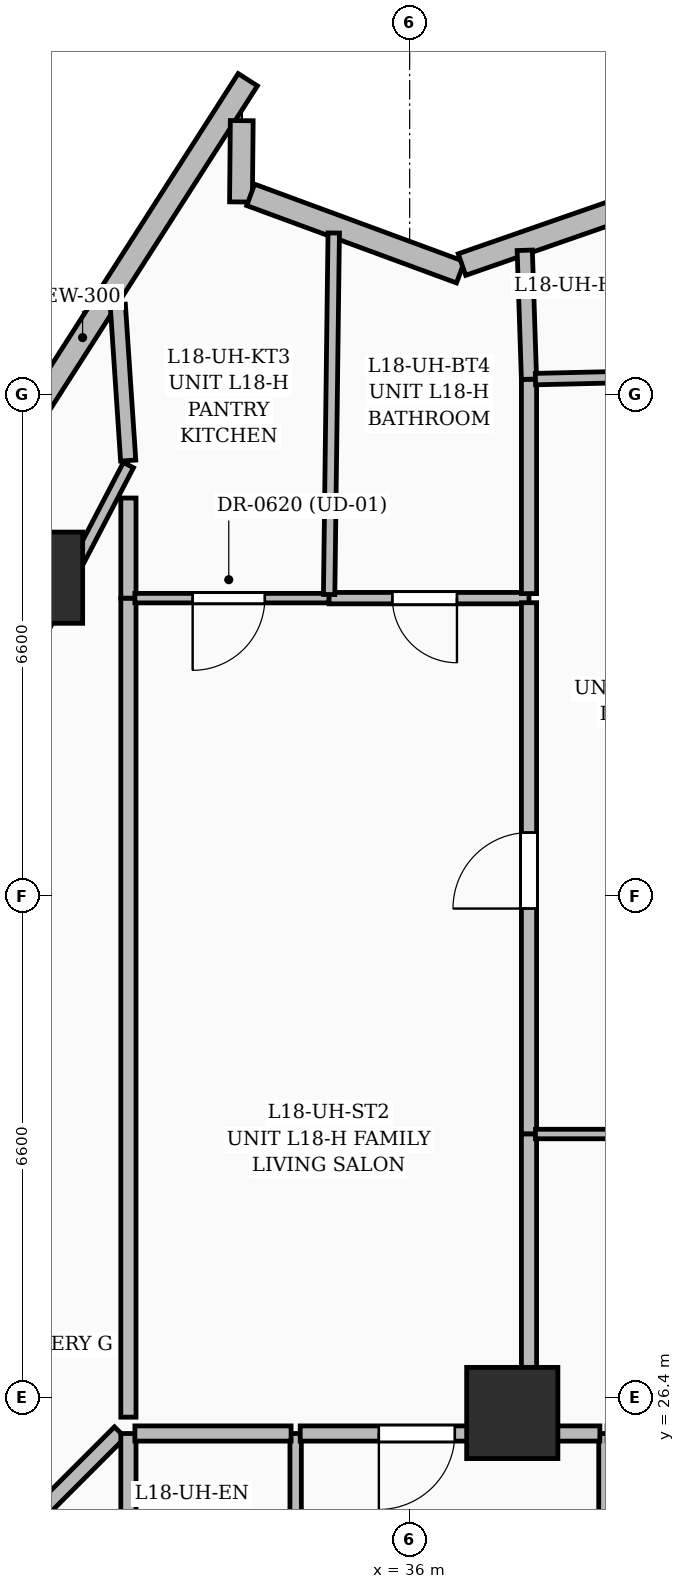
"""IFC4 building model, lengths in metres.
Left out: names, types, materials, properties, quantities, classifications, styles, units other than length and angle.
Written with IfcOpenShell. Run it as: python <this file> out.ifc"""

import sys

from ifc_helpers import new_model, si_unit, direction, frame, frame_2d, origin, origin_2d, place, context, subcontext, project, spatial, rectangle, extrude, element, fill, save


model = new_model("IFC4")
c1 = context("Model", 3, precision=1e-05, world=origin(), true_north=direction((0.0, 1.0)))
c2 = subcontext(c1, "Body", "Model", "MODEL_VIEW")
j1 = project(units=[si_unit("LENGTHUNIT", "METRE"), si_unit("PLANEANGLEUNIT", "RADIAN")], contexts=[c1])
p1 = place(None, origin())
s1 = spatial("IfcSite", under=j1, at=p1, CompositionType="ELEMENT")
p2 = place(p1, origin())
s2 = spatial("IfcBuilding", under=s1, at=p2, CompositionType="ELEMENT")
p3 = place(p2, frame((0.0, 0.0, 75.0)))
s3 = spatial("IfcBuildingStorey", under=s2, at=p3, CompositionType="ELEMENT", Elevation=75.0)
for number, where, z_axis, x_axis in (
    (1, (37.35, 26.2, 0.0), (0.0, 0.0, 1.0), (1.0, 0.0, 0.0)),
    (2, (31.098, 37.189, 0.0), (0.0, 0.0, 1.0), (1.0, 0.0, 0.0)),
):
    element("IfcColumn", number, at=place(p3, frame(where, z_axis=z_axis, x_axis=x_axis)), inside=s3, PredefinedType="COLUMN", context=c2, shape_type="SweptSolid", body=[
        extrude(rectangle(XDim=1.2, YDim=1.2, at=origin_2d()), origin(), (0.0, 0.0, 1.0), 3.6),
    ])
p4 = place(p3, frame((29.524, 36.955, 0.0), z_axis=(0.0, 0.0, 1.0), x_axis=(0.539470626143, 0.842004420136, 0.0)))
e3 = element("IfcWall", 3, at=p4, inside=s3, PredefinedType="SOLIDWALL", context=c2, shape_type="SweptSolid", body=[
    extrude(rectangle(XDim=8.058, YDim=0.3, at=frame_2d((4.029, 0.0))), origin(), (0.0, 0.0, 1.0), 3.35),
])
p5 = place(p4, frame((1.55, 0.0, 0.8)))
e4 = element("IfcOpeningElement", 4, at=p5, cuts=e3, PredefinedType="OPENING", context=c2, shape_type="SweptSolid", body=[
    extrude(rectangle(XDim=1.2, YDim=1.8, at=frame_2d((0.6, 0.9))), frame((0.0, 0.16, 0.0), z_axis=(0.0, -1.0, 0.0), x_axis=(1.0, 0.0, 0.0)), (0.0, 0.0, 1.0), 0.32),
])
p6 = place(p3, frame((33.791, 43.202, 0.0), z_axis=(0.0, 0.0, 1.0), x_axis=(-0.009584224316, -0.999954070267, 0.0)))
e5 = element("IfcWall", 5, at=p6, inside=s3, PredefinedType="SOLIDWALL", context=c2, shape_type="SweptSolid", body=[
    extrude(rectangle(XDim=1.07, YDim=0.3, at=frame_2d((0.535, 0.0))), origin(), (0.0, 0.0, 1.0), 3.35),
])
p7 = place(p3, frame((33.909, 42.225, 0.0), z_axis=(0.0, 0.0, 1.0), x_axis=(0.938225446259, -0.346024582931, 0.0)))
e6 = element("IfcWall", 6, at=p7, inside=s3, PredefinedType="SOLIDWALL", context=c2, shape_type="SweptSolid", body=[
    extrude(rectangle(XDim=2.941, YDim=0.3, at=frame_2d((1.471, 0.0))), origin(), (0.0, 0.0, 1.0), 3.35),
])
p8 = place(p3, frame((36.688, 41.309, 0.0), z_axis=(0.0, 0.0, 1.0), x_axis=(0.944571305793, 0.328306332978, 0.0)))
e7 = element("IfcWall", 7, at=p8, inside=s3, PredefinedType="SOLIDWALL", context=c2, shape_type="SweptSolid", body=[
    extrude(rectangle(XDim=2.917, YDim=0.3, at=frame_2d((1.458, 0.0))), origin(), (0.0, 0.0, 1.0), 3.35),
])
p9 = place(p3, frame((21.4, 17.75, 0.0), z_axis=(0.0, 0.0, 1.0), x_axis=(0.46207959711, 0.886838455376, 0.0)))
e8 = element("IfcWall", 8, at=p9, inside=s3, PredefinedType="PARTITIONING", context=c2, shape_type="SweptSolid", body=[
    extrude(rectangle(XDim=23.589, YDim=0.15, at=frame_2d((11.795, 0.0))), origin(), (0.0, 0.0, 1.0), 2.345),
])
p10 = place(p3, frame((32.297, 38.73, 0.0), z_axis=(0.0, 0.0, 1.0), x_axis=(-0.066629370629, 0.997777794386, 0.0)))
e9 = element("IfcWall", 9, at=p10, inside=s3, PredefinedType="PARTITIONING", context=c2, shape_type="SweptSolid", body=[
    extrude(rectangle(XDim=2.056, YDim=0.2, at=frame_2d((1.028, 0.0))), origin(), (0.0, 0.0, 1.0), 3.35),
])
p11 = place(p3, frame((32.187, 25.947, 0.0), z_axis=(0.0, 0.0, 1.0), x_axis=(-0.707106781187, -0.707106781187, 0.0)))
e10 = element("IfcWall", 10, at=p11, inside=s3, PredefinedType="PARTITIONING", context=c2, shape_type="SweptSolid", body=[
    extrude(rectangle(XDim=3.135, YDim=0.2, at=frame_2d((1.568, 0.0))), origin(), (0.0, 0.0, 1.0), 3.35),
])
p12 = place(p3, frame((32.3, 21.8, 0.0), z_axis=(0.0, 0.0, 1.0), x_axis=(0.0, 1.0, 0.0)))
e11 = element("IfcWall", 11, at=p12, inside=s3, PredefinedType="PARTITIONING", context=c2, shape_type="SweptSolid", body=[
    extrude(rectangle(XDim=4.13, YDim=0.2, at=frame_2d((2.065, 0.0))), origin(), (0.0, 0.0, 1.0), 2.911),
])
p13 = place(p3, frame((32.3, 26.145, 0.0), z_axis=(0.0, 0.0, 1.0), x_axis=(0.0, 1.0, 0.0)))
e12 = element("IfcWall", 12, at=p13, inside=s3, PredefinedType="PARTITIONING", context=c2, shape_type="SweptSolid", body=[
    extrude(rectangle(XDim=10.775, YDim=0.2, at=frame_2d((5.387, 0.0))), origin(), (0.0, 0.0, 1.0), 2.345),
])
p14 = place(p3, frame((32.3, 36.92, 0.0), z_axis=(0.0, 0.0, 1.0), x_axis=(0.0, 1.0, 0.0)))
e13 = element("IfcWall", 13, at=p14, inside=s3, PredefinedType="PARTITIONING", context=c2, shape_type="SweptSolid", body=[
    extrude(rectangle(XDim=1.317, YDim=0.2, at=frame_2d((0.659, 0.0))), origin(), (0.0, 0.0, 1.0), 2.37),
])
p15 = place(p3, frame((38.55, 25.93, 0.0), z_axis=(0.0, 0.0, 1.0), x_axis=(0.0, -1.0, 0.0)))
e14 = element("IfcWall", 14, at=p15, inside=s3, PredefinedType="PARTITIONING", context=c2, shape_type="SweptSolid", body=[
    extrude(rectangle(XDim=4.202, YDim=0.125, at=frame_2d((2.101, 0.0))), origin(), (0.0, 0.0, 1.0), 3.35),
])
p16 = place(p3, frame((34.5, 25.93, 0.0), z_axis=(0.0, 0.0, 1.0), x_axis=(0.0, -1.0, 0.0)))
e15 = element("IfcWall", 15, at=p16, inside=s3, PredefinedType="PARTITIONING", context=c2, shape_type="SweptSolid", body=[
    extrude(rectangle(XDim=4.19, YDim=0.15, at=frame_2d((2.095, 0.0))), origin(), (0.0, 0.0, 1.0), 3.35),
])
p17 = place(p16, frame((1.758, 0.0, 0.0)))
e16 = element("IfcOpeningElement", 16, at=p17, cuts=e15, PredefinedType="OPENING", context=c2, shape_type="SweptSolid", body=[
    extrude(rectangle(XDim=0.85, YDim=2.1, at=frame_2d((0.425, 1.05))), frame((0.0, 0.085, 0.0), z_axis=(0.0, -1.0, 0.0), x_axis=(1.0, 0.0, 0.0)), (0.0, 0.0, 1.0), 0.17),
])
p18 = place(p3, frame((37.57, 25.93, 0.0), z_axis=(0.0, 0.0, 1.0), x_axis=(-1.0, 0.0, 0.0)))
e17 = element("IfcWall", 17, at=p18, inside=s3, PredefinedType="PARTITIONING", context=c2, shape_type="SweptSolid", body=[
    extrude(rectangle(XDim=3.01, YDim=0.2, at=frame_2d((1.505, 0.0))), origin(), (0.0, 0.0, 1.0), 3.35),
])
p19 = place(p18, frame((0.975, 0.0, 0.0)))
e18 = element("IfcOpeningElement", 18, at=p19, cuts=e17, PredefinedType="OPENING", context=c2, shape_type="SweptSolid", body=[
    extrude(rectangle(XDim=1.0, YDim=2.2, at=frame_2d((0.5, 1.1))), frame((0.0, 0.11, 0.0), z_axis=(0.0, -1.0, 0.0), x_axis=(1.0, 0.0, 0.0)), (0.0, 0.0, 1.0), 0.22),
])
p20 = place(p3, frame((38.502, 25.93, 0.0), z_axis=(0.0, 0.0, 1.0), x_axis=(-1.0, 0.0, 0.0)))
e19 = element("IfcWall", 19, at=p20, inside=s3, PredefinedType="PARTITIONING", context=c2, shape_type="SweptSolid", body=[
    extrude(rectangle(XDim=0.932, YDim=0.2, at=frame_2d((0.466, 0.0))), origin(), (0.0, 0.0, 1.0), 2.309),
])
p21 = place(p3, frame((34.44, 25.93, 0.0), z_axis=(0.0, 0.0, 1.0), x_axis=(-1.0, 0.0, 0.0)))
e20 = element("IfcWall", 20, at=p21, inside=s3, PredefinedType="PARTITIONING", context=c2, shape_type="SweptSolid", body=[
    extrude(rectangle(XDim=2.055, YDim=0.2, at=frame_2d((1.027, 0.0))), origin(), (0.0, 0.0, 1.0), 2.911),
])
p22 = place(p3, frame((34.94, 36.92, 0.0), z_axis=(0.0, 0.0, 1.0), x_axis=(-1.0, 0.0, 0.0)))
e21 = element("IfcWall", 21, at=p22, inside=s3, PredefinedType="PARTITIONING", context=c2, shape_type="SweptSolid", body=[
    extrude(rectangle(XDim=2.555, YDim=0.125, at=frame_2d((1.277, 0.0))), origin(), (0.0, 0.0, 1.0), 2.37),
])
p23 = place(p22, frame((0.845, 0.0, 0.0)))
e22 = element("IfcOpeningElement", 22, at=p23, cuts=e21, PredefinedType="OPENING", context=c2, shape_type="SweptSolid", body=[
    extrude(rectangle(XDim=0.95, YDim=2.2, at=frame_2d((0.475, 1.1))), frame((0.0, 0.072, 0.0), z_axis=(0.0, -1.0, 0.0), x_axis=(1.0, 0.0, 0.0)), (0.0, 0.0, 1.0), 0.145),
])
p24 = place(p3, frame((37.57, 36.92, 0.0), z_axis=(0.0, 0.0, 1.0), x_axis=(-1.0, 0.0, 0.0)))
e23 = element("IfcWall", 23, at=p24, inside=s3, PredefinedType="PARTITIONING", context=c2, shape_type="SweptSolid", body=[
    extrude(rectangle(XDim=2.63, YDim=0.15, at=frame_2d((1.315, 0.0))), origin(), (0.0, 0.0, 1.0), 2.37),
])
p25 = place(p24, frame((0.948, 0.0, 0.0)))
e24 = element("IfcOpeningElement", 24, at=p25, cuts=e23, PredefinedType="OPENING", context=c2, shape_type="SweptSolid", body=[
    extrude(rectangle(XDim=0.85, YDim=2.1, at=frame_2d((0.425, 1.05))), frame((0.0, 0.085, 0.0), z_axis=(0.0, -1.0, 0.0), x_axis=(1.0, 0.0, 0.0)), (0.0, 0.0, 1.0), 0.17),
])
p26 = place(p3, frame((37.57, 29.87, 0.0), z_axis=(0.0, 0.0, 1.0), x_axis=(0.0, 1.0, 0.0)))
e25 = element("IfcWall", 25, at=p26, inside=s3, PredefinedType="PARTITIONING", context=c2, shape_type="SweptSolid", body=[
    extrude(rectangle(XDim=6.99, YDim=0.2, at=frame_2d((3.495, 0.0))), origin(), (0.0, 0.0, 1.0), 2.37),
])
p27 = place(p26, frame((2.966, 0.0, 0.0)))
e26 = element("IfcOpeningElement", 26, at=p27, cuts=e25, PredefinedType="OPENING", context=c2, shape_type="SweptSolid", body=[
    extrude(rectangle(XDim=1.0, YDim=2.2, at=frame_2d((0.5, 1.1))), frame((0.0, 0.11, 0.0), z_axis=(0.0, -1.0, 0.0), x_axis=(1.0, 0.0, 0.0)), (0.0, 0.0, 1.0), 0.22),
])
p28 = place(p3, frame((37.57, 26.015, 0.0), z_axis=(0.0, 0.0, 1.0), x_axis=(0.0, 1.0, 0.0)))
e27 = element("IfcWall", 27, at=p28, inside=s3, PredefinedType="PARTITIONING", context=c2, shape_type="SweptSolid", body=[
    extrude(rectangle(XDim=3.855, YDim=0.2, at=frame_2d((1.928, 0.0))), origin(), (0.0, 0.0, 1.0), 2.911),
])
p29 = place(p3, frame((34.94, 36.968, 0.0), z_axis=(0.0, 0.0, 1.0), x_axis=(0.012728014725, 0.99991899554, 0.0)))
e28 = element("IfcWall", 28, at=p29, inside=s3, PredefinedType="PARTITIONING", context=c2, shape_type="SweptSolid", body=[
    extrude(rectangle(XDim=4.757, YDim=0.15, at=frame_2d((2.378, 0.0))), origin(), (0.0, 0.0, 1.0), 2.37),
])
p30 = place(p3, frame((37.57, 36.98, 0.0), z_axis=(0.0, 0.0, 1.0), x_axis=(0.0, 1.0, 0.0)))
e29 = element("IfcWall", 29, at=p30, inside=s3, PredefinedType="PARTITIONING", context=c2, shape_type="SweptSolid", body=[
    extrude(rectangle(XDim=2.82, YDim=0.2, at=frame_2d((1.41, 0.0))), origin(), (0.0, 0.0, 1.0), 2.37),
])
p31 = place(p3, frame((37.57, 39.8, 0.0), z_axis=(0.0, 0.0, 1.0), x_axis=(-0.033089686033, 0.999452386399, 0.0)))
e30 = element("IfcWall", 30, at=p31, inside=s3, PredefinedType="PARTITIONING", context=c2, shape_type="SweptSolid", body=[
    extrude(rectangle(XDim=1.697, YDim=0.2, at=frame_2d((0.849, 0.0))), origin(), (0.0, 0.0, 1.0), 3.35),
])
p32 = place(p3, frame((41.449, 39.891, 0.0), z_axis=(0.0, 0.0, 1.0), x_axis=(-0.999721247685, -0.02360989047, 0.0)))
e31 = element("IfcWall", 31, at=p32, inside=s3, PredefinedType="PARTITIONING", context=c2, shape_type="SweptSolid", body=[
    extrude(rectangle(XDim=3.795, YDim=0.15, at=frame_2d((1.897, 0.0))), origin(), (0.0, 0.0, 1.0), 3.35),
])
p33 = place(p32, frame((1.506, 0.0, 0.0)))
e32 = element("IfcOpeningElement", 32, at=p33, cuts=e31, PredefinedType="OPENING", context=c2, shape_type="SweptSolid", body=[
    extrude(rectangle(XDim=0.85, YDim=2.1, at=frame_2d((0.425, 1.05))), frame((0.0, 0.085, 0.0), z_axis=(0.0, -1.0, 0.0), x_axis=(1.0, 0.0, 0.0)), (0.0, 0.0, 1.0), 0.17),
])
p34 = place(p3, frame((37.655, 29.87, 0.0), z_axis=(0.0, 0.0, 1.0), x_axis=(1.0, 0.0, 0.0)))
e33 = element("IfcWall", 33, at=p34, inside=s3, PredefinedType="PARTITIONING", context=c2, shape_type="SweptSolid", body=[
    extrude(rectangle(XDim=4.175, YDim=0.125, at=frame_2d((2.087, 0.0))), origin(), (0.0, 0.0, 1.0), 3.35),
])
p35 = place(p34, frame((1.57, 0.0, 0.0)))
e34 = element("IfcOpeningElement", 34, at=p35, cuts=e33, PredefinedType="OPENING", context=c2, shape_type="SweptSolid", body=[
    extrude(rectangle(XDim=0.95, YDim=2.2, at=frame_2d((0.475, 1.1))), frame((0.0, 0.072, 0.0), z_axis=(0.0, -1.0, 0.0), x_axis=(1.0, 0.0, 0.0)), (0.0, 0.0, 1.0), 0.145),
])
p36 = place(p23, origin())
e35 = element("IfcDoor", 35, at=p36, inside=s3, OperationType="SINGLE_SWING_RIGHT", PredefinedType="DOOR", context=c2, shape_type="SweptSolid", body=[
    extrude(rectangle(XDim=0.95, YDim=2.2, at=frame_2d((0.475, 1.1))), frame((0.0, 0.025, 0.0), z_axis=(0.0, -1.0, 0.0), x_axis=(1.0, 0.0, 0.0)), (0.0, 0.0, 1.0), 0.05),
])
fill(e22, e35)
p37 = place(p25, origin())
e36 = element("IfcDoor", 36, at=p37, inside=s3, OperationType="SINGLE_SWING_LEFT", PredefinedType="DOOR", context=c2, shape_type="SweptSolid", body=[
    extrude(rectangle(XDim=0.85, YDim=2.1, at=frame_2d((0.425, 1.05))), frame((0.0, 0.025, 0.0), z_axis=(0.0, -1.0, 0.0), x_axis=(1.0, 0.0, 0.0)), (0.0, 0.0, 1.0), 0.05),
])
fill(e24, e36)
p38 = place(p19, origin())
e37 = element("IfcDoor", 37, at=p38, inside=s3, OperationType="SINGLE_SWING_RIGHT", PredefinedType="DOOR", context=c2, shape_type="SweptSolid", body=[
    extrude(rectangle(XDim=1.0, YDim=2.2, at=frame_2d((0.5, 1.1))), frame((0.0, 0.025, 0.0), z_axis=(0.0, -1.0, 0.0), x_axis=(1.0, 0.0, 0.0)), (0.0, 0.0, 1.0), 0.05),
])
fill(e18, e37)
p39 = place(p27, origin())
e38 = element("IfcDoor", 38, at=p39, inside=s3, OperationType="SINGLE_SWING_LEFT", PredefinedType="DOOR", context=c2, shape_type="SweptSolid", body=[
    extrude(rectangle(XDim=1.0, YDim=2.2, at=frame_2d((0.5, 1.1))), frame((0.0, 0.025, 0.0), z_axis=(0.0, -1.0, 0.0), x_axis=(1.0, 0.0, 0.0)), (0.0, 0.0, 1.0), 0.05),
])
fill(e26, e38)
save(model, sys.argv[1])
